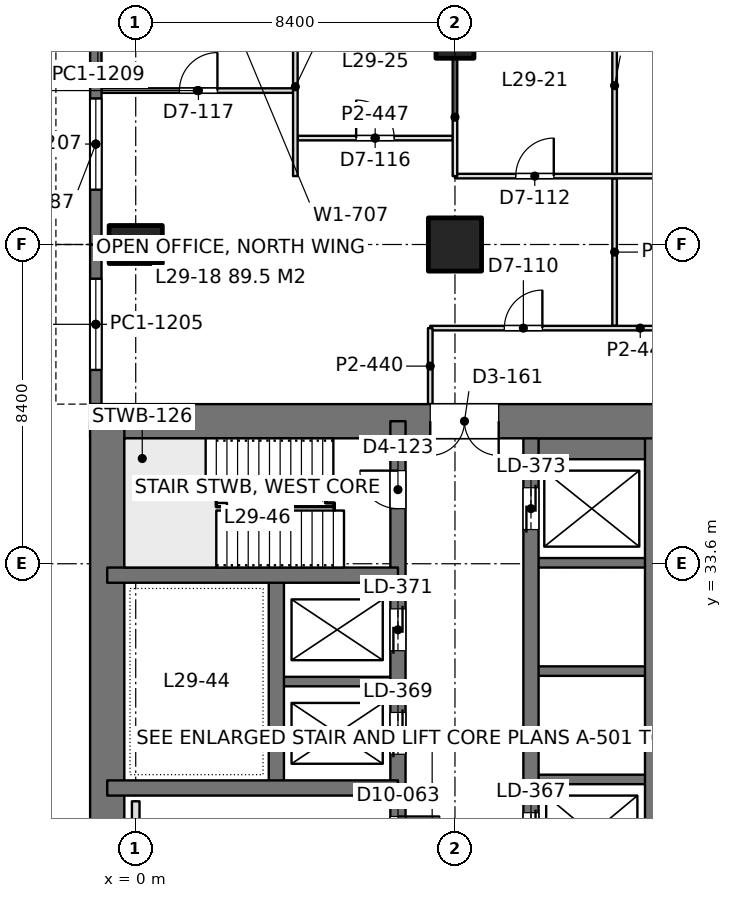
"""IFC4 building model, lengths in metres.
Left out: names, types, materials, properties, quantities, classifications, styles, units other than length and angle.
Written with IfcOpenShell. Run it as: python <this file> out.ifc"""

import sys

from ifc_helpers import new_model, si_unit, direction, frame, frame_2d, origin, origin_2d, place, context, subcontext, project, spatial, rectangle, extrude, element, fill, save


model = new_model("IFC4")
c1 = context("Model", 3, precision=1e-05, world=origin(), true_north=direction((0.0, 1.0)))
c2 = subcontext(c1, "Body", "Model", "MODEL_VIEW")
j1 = project(units=[si_unit("LENGTHUNIT", "METRE"), si_unit("PLANEANGLEUNIT", "RADIAN")], contexts=[c1])
p1 = place(None, origin())
s1 = spatial("IfcSite", under=j1, at=p1, CompositionType="ELEMENT")
p2 = place(p1, origin())
s2 = spatial("IfcBuilding", under=s1, at=p2, CompositionType="ELEMENT")
p3 = place(p2, frame((0.0, 0.0, 130.2)))
s3 = spatial("IfcBuildingStorey", under=s2, at=p3, CompositionType="ELEMENT", Elevation=130.2)
p4 = place(p3, frame((0.0, 42.0, 0.0), z_axis=(0.0, 0.0, 1.0), x_axis=(0.0, 1.0, 0.0)))
e1 = element("IfcColumn", 1, at=p4, inside=s3, PredefinedType="COLUMN", context=c2, shape_type="SweptSolid", body=[
    extrude(rectangle(XDim=1.0, YDim=1.4, at=origin_2d()), origin(), (0.0, 0.0, 1.0), 4.2),
])
p5 = place(p3, frame((8.4, 42.0, 0.0), z_axis=(0.0, 0.0, 1.0), x_axis=(1.0, 0.0, 0.0)))
e2 = element("IfcColumn", 2, at=p5, inside=s3, PredefinedType="COLUMN", context=c2, shape_type="SweptSolid", body=[
    extrude(rectangle(XDim=1.4, YDim=1.4, at=origin_2d()), origin(), (0.0, 0.0, 1.0), 4.2),
])
p6 = place(p3, frame((8.4, 47.6, 0.0), z_axis=(0.0, 0.0, 1.0), x_axis=(1.0, 0.0, 0.0)))
e3 = element("IfcColumn", 3, at=p6, inside=s3, PredefinedType="COLUMN", context=c2, shape_type="SweptSolid", body=[
    extrude(rectangle(XDim=1.0, YDim=1.4, at=origin_2d()), origin(), (0.0, 0.0, 1.0), 4.2),
])
p7 = place(p3, frame((-1.2, 37.35, 0.0), z_axis=(0.0, 0.0, 1.0), x_axis=(1.0, 0.0, 0.0)))
e4 = element("IfcWall", 4, at=p7, inside=s3, PredefinedType="SHEAR", context=c2, shape_type="SweptSolid", body=[
    extrude(rectangle(XDim=18.0, YDim=0.9, at=frame_2d((9.0, 0.0))), origin(), (0.0, 0.0, 1.0), 4.2),
])
p8 = place(p7, frame((8.95, 0.0, 0.0)))
e5 = element("IfcOpeningElement", 5, at=p8, cuts=e4, PredefinedType="OPENING", context=c2, shape_type="SweptSolid", body=[
    extrude(rectangle(XDim=1.8, YDim=2.4, at=frame_2d((0.9, 1.2))), frame((0.0, 0.46, 0.0), z_axis=(0.0, -1.0, 0.0), x_axis=(1.0, 0.0, 0.0)), (0.0, 0.0, 1.0), 0.92),
])
p9 = place(p3, frame((-0.75, 13.05, 0.0), z_axis=(0.0, 0.0, 1.0), x_axis=(0.0, 1.0, 0.0)))
e6 = element("IfcWall", 6, at=p9, inside=s3, PredefinedType="SHEAR", context=c2, shape_type="SweptSolid", body=[
    extrude(rectangle(XDim=24.3, YDim=0.9, at=frame_2d((12.15, 0.0))), origin(), (0.0, 0.0, 1.0), 4.2),
])
p10 = place(p3, frame((6.9, 13.05, 0.0), z_axis=(0.0, 0.0, 1.0), x_axis=(0.0, 1.0, 0.0)))
e7 = element("IfcWall", 7, at=p10, inside=s3, PredefinedType="SHEAR", context=c2, shape_type="SweptSolid", body=[
    extrude(rectangle(XDim=24.3, YDim=0.4, at=frame_2d((12.15, 0.0))), origin(), (0.0, 0.0, 1.0), 4.2),
])
p11 = place(p10, frame((1.3, 0.0, 0.0)))
e8 = element("IfcOpeningElement", 8, at=p11, cuts=e7, PredefinedType="OPENING", context=c2, shape_type="SweptSolid", body=[
    extrude(rectangle(XDim=1.0, YDim=2.2, at=frame_2d((0.5, 1.1))), frame((0.0, 0.21, 0.0), z_axis=(0.0, -1.0, 0.0), x_axis=(1.0, 0.0, 0.0)), (0.0, 0.0, 1.0), 0.42),
])
p12 = place(p10, frame((22.0, 0.0, 0.0)))
e9 = element("IfcOpeningElement", 9, at=p12, cuts=e7, PredefinedType="OPENING", context=c2, shape_type="SweptSolid", body=[
    extrude(rectangle(XDim=1.0, YDim=2.2, at=frame_2d((0.5, 1.1))), frame((0.0, 0.21, 0.0), z_axis=(0.0, -1.0, 0.0), x_axis=(1.0, 0.0, 0.0)), (0.0, 0.0, 1.0), 0.42),
])
p13 = place(p10, frame((5.55, 0.0, 0.0)))
e10 = element("IfcOpeningElement", 10, at=p13, cuts=e7, PredefinedType="OPENING", context=c2, shape_type="SweptSolid", body=[
    extrude(rectangle(XDim=1.0, YDim=2.2, at=frame_2d((0.5, 1.1))), frame((0.0, 0.21, 0.0), z_axis=(0.0, -1.0, 0.0), x_axis=(1.0, 0.0, 0.0)), (0.0, 0.0, 1.0), 0.42),
])
p14 = place(p10, frame((9.55, 0.0, 0.0)))
e11 = element("IfcOpeningElement", 11, at=p14, cuts=e7, PredefinedType="OPENING", context=c2, shape_type="SweptSolid", body=[
    extrude(rectangle(XDim=1.0, YDim=2.2, at=frame_2d((0.5, 1.1))), frame((0.0, 0.21, 0.0), z_axis=(0.0, -1.0, 0.0), x_axis=(1.0, 0.0, 0.0)), (0.0, 0.0, 1.0), 0.42),
])
p15 = place(p10, frame((12.8, 0.0, 0.0)))
e12 = element("IfcOpeningElement", 12, at=p15, cuts=e7, PredefinedType="OPENING", context=c2, shape_type="SweptSolid", body=[
    extrude(rectangle(XDim=1.1, YDim=2.2, at=frame_2d((0.55, 1.1))), frame((0.0, 0.21, 0.0), z_axis=(0.0, -1.0, 0.0), x_axis=(1.0, 0.0, 0.0)), (0.0, 0.0, 1.0), 0.42),
])
p16 = place(p10, frame((15.538, 0.0, 0.0)))
e13 = element("IfcOpeningElement", 13, at=p16, cuts=e7, PredefinedType="OPENING", context=c2, shape_type="SweptSolid", body=[
    extrude(rectangle(XDim=1.1, YDim=2.2, at=frame_2d((0.55, 1.1))), frame((0.0, 0.21, 0.0), z_axis=(0.0, -1.0, 0.0), x_axis=(1.0, 0.0, 0.0)), (0.0, 0.0, 1.0), 0.42),
])
p17 = place(p10, frame((18.262, 0.0, 0.0)))
e14 = element("IfcOpeningElement", 14, at=p17, cuts=e7, PredefinedType="OPENING", context=c2, shape_type="SweptSolid", body=[
    extrude(rectangle(XDim=1.1, YDim=2.2, at=frame_2d((0.55, 1.1))), frame((0.0, 0.21, 0.0), z_axis=(0.0, -1.0, 0.0), x_axis=(1.0, 0.0, 0.0)), (0.0, 0.0, 1.0), 0.42),
])
p18 = place(p3, frame((10.4, 13.05, 0.0), z_axis=(0.0, 0.0, 1.0), x_axis=(0.0, 1.0, 0.0)))
e15 = element("IfcWall", 15, at=p18, inside=s3, PredefinedType="SHEAR", context=c2, shape_type="SweptSolid", body=[
    extrude(rectangle(XDim=24.3, YDim=0.4, at=frame_2d((12.15, 0.0))), origin(), (0.0, 0.0, 1.0), 4.2),
])
p19 = place(p18, frame((10.05, 0.0, 0.0)))
e16 = element("IfcOpeningElement", 16, at=p19, cuts=e15, PredefinedType="OPENING", context=c2, shape_type="SweptSolid", body=[
    extrude(rectangle(XDim=1.1, YDim=2.2, at=frame_2d((0.55, 1.1))), frame((0.0, 0.21, 0.0), z_axis=(0.0, -1.0, 0.0), x_axis=(1.0, 0.0, 0.0)), (0.0, 0.0, 1.0), 0.42),
])
p20 = place(p18, frame((12.9, 0.0, 0.0)))
e17 = element("IfcOpeningElement", 17, at=p20, cuts=e15, PredefinedType="OPENING", context=c2, shape_type="SweptSolid", body=[
    extrude(rectangle(XDim=1.1, YDim=2.2, at=frame_2d((0.55, 1.1))), frame((0.0, 0.21, 0.0), z_axis=(0.0, -1.0, 0.0), x_axis=(1.0, 0.0, 0.0)), (0.0, 0.0, 1.0), 0.42),
])
p21 = place(p18, frame((21.45, 0.0, 0.0)))
e18 = element("IfcOpeningElement", 18, at=p21, cuts=e15, PredefinedType="OPENING", context=c2, shape_type="SweptSolid", body=[
    extrude(rectangle(XDim=1.1, YDim=2.2, at=frame_2d((0.55, 1.1))), frame((0.0, 0.21, 0.0), z_axis=(0.0, -1.0, 0.0), x_axis=(1.0, 0.0, 0.0)), (0.0, 0.0, 1.0), 0.42),
])
p22 = place(p18, frame((2.35, 0.0, 0.0)))
e19 = element("IfcOpeningElement", 19, at=p22, cuts=e15, PredefinedType="OPENING", context=c2, shape_type="SweptSolid", body=[
    extrude(rectangle(XDim=1.8, YDim=2.4, at=frame_2d((0.9, 1.2))), frame((0.0, 0.21, 0.0), z_axis=(0.0, -1.0, 0.0), x_axis=(1.0, 0.0, 0.0)), (0.0, 0.0, 1.0), 0.42),
])
p23 = place(p18, frame((5.8, 0.0, 0.0)))
e20 = element("IfcOpeningElement", 20, at=p23, cuts=e15, PredefinedType="OPENING", context=c2, shape_type="SweptSolid", body=[
    extrude(rectangle(XDim=1.8, YDim=2.4, at=frame_2d((0.9, 1.2))), frame((0.0, 0.21, 0.0), z_axis=(0.0, -1.0, 0.0), x_axis=(1.0, 0.0, 0.0)), (0.0, 0.0, 1.0), 0.42),
])
p24 = place(p3, frame((13.6, 22.225, 0.0), z_axis=(0.0, 0.0, 1.0), x_axis=(0.0, 1.0, 0.0)))
e21 = element("IfcWall", 21, at=p24, inside=s3, PredefinedType="SHEAR", context=c2, shape_type="SweptSolid", body=[
    extrude(rectangle(XDim=15.125, YDim=0.4, at=frame_2d((7.562, 0.0))), origin(), (0.0, 0.0, 1.0), 4.2),
])
for number, where, z_axis, x_axis in (
    (22, (-0.75, 27.7, 0.0), (0.0, 0.0, 1.0), (1.0, 0.0, 0.0)),
    (23, (-0.75, 33.3, 0.0), (0.0, 0.0, 1.0), (1.0, 0.0, 0.0)),
):
    element("IfcWall", number, at=place(p3, frame(where, z_axis=z_axis, x_axis=x_axis)), inside=s3, PredefinedType="SHEAR", context=c2, shape_type="SweptSolid", body=[
        extrude(rectangle(XDim=7.65, YDim=0.4, at=frame_2d((3.825, 0.0))), origin(), (0.0, 0.0, 1.0), 4.2),
    ])
p25 = place(p3, frame((3.7, 27.7, 0.0), z_axis=(0.0, 0.0, 1.0), x_axis=(0.0, 1.0, 0.0)))
e24 = element("IfcWall", 24, at=p25, inside=s3, PredefinedType="SHEAR", context=c2, shape_type="SweptSolid", body=[
    extrude(rectangle(XDim=5.6, YDim=0.4, at=frame_2d((2.8, 0.0))), origin(), (0.0, 0.0, 1.0), 4.2),
])
p26 = place(p3, frame((3.7, 30.5, 0.0), z_axis=(0.0, 0.0, 1.0), x_axis=(1.0, 0.0, 0.0)))
e25 = element("IfcWall", 25, at=p26, inside=s3, PredefinedType="SHEAR", context=c2, shape_type="SweptSolid", body=[
    extrude(rectangle(XDim=3.2, YDim=0.25, at=frame_2d((1.6, 0.0))), origin(), (0.0, 0.0, 1.0), 4.2),
])
for number, where, z_axis, x_axis in (
    (26, (10.4, 27.925, 0.0), (0.0, 0.0, 1.0), (1.0, 0.0, 0.0)),
    (27, (10.4, 30.775, 0.0), (0.0, 0.0, 1.0), (1.0, 0.0, 0.0)),
    (28, (10.4, 33.625, 0.0), (0.0, 0.0, 1.0), (1.0, 0.0, 0.0)),
):
    element("IfcWall", number, at=place(p3, frame(where, z_axis=z_axis, x_axis=x_axis)), inside=s3, PredefinedType="SHEAR", context=c2, shape_type="SweptSolid", body=[
        extrude(rectangle(XDim=3.2, YDim=0.25, at=frame_2d((1.6, 0.0))), origin(), (0.0, 0.0, 1.0), 4.2),
    ])
p27 = place(p3, frame((10.4, 36.625, 0.0), z_axis=(0.0, 0.0, 1.0), x_axis=(1.0, 0.0, 0.0)))
e29 = element("IfcWall", 29, at=p27, inside=s3, PredefinedType="SHEAR", context=c2, shape_type="SweptSolid", body=[
    extrude(rectangle(XDim=3.2, YDim=0.55, at=frame_2d((1.6, 0.0))), origin(), (0.0, 0.0, 1.0), 4.2),
])
p28 = place(p3, frame((-1.05, 37.8, 0.0), z_axis=(0.0, 0.0, 1.0), x_axis=(0.0, 1.0, 0.0)))
e30 = element("IfcWall", 30, at=p28, inside=s3, PredefinedType="SOLIDWALL", context=c2, shape_type="SweptSolid", body=[
    extrude(rectangle(XDim=4.2, YDim=0.3, at=frame_2d((2.1, 0.0))), origin(), (0.0, 0.0, 1.0), 4.05),
])
p29 = place(p28, frame((0.9, 0.0, 0.9)))
e31 = element("IfcOpeningElement", 31, at=p29, cuts=e30, PredefinedType="OPENING", context=c2, shape_type="SweptSolid", body=[
    extrude(rectangle(XDim=2.4, YDim=1.9, at=frame_2d((1.2, 0.95))), frame((0.0, 0.16, 0.0), z_axis=(0.0, -1.0, 0.0), x_axis=(1.0, 0.0, 0.0)), (0.0, 0.0, 1.0), 0.32),
])
p30 = place(p3, frame((-1.05, 42.0, 0.0), z_axis=(0.0, 0.0, 1.0), x_axis=(0.0, 1.0, 0.0)))
e32 = element("IfcWall", 32, at=p30, inside=s3, PredefinedType="SOLIDWALL", context=c2, shape_type="SweptSolid", body=[
    extrude(rectangle(XDim=5.285, YDim=0.3, at=frame_2d((2.643, 0.0))), origin(), (0.0, 0.0, 1.0), 4.05),
])
p31 = place(p30, frame((1.443, 0.0, 0.9)))
e33 = element("IfcOpeningElement", 33, at=p31, cuts=e32, PredefinedType="OPENING", context=c2, shape_type="SweptSolid", body=[
    extrude(rectangle(XDim=2.4, YDim=1.9, at=frame_2d((1.2, 0.95))), frame((0.0, 0.16, 0.0), z_axis=(0.0, -1.0, 0.0), x_axis=(1.0, 0.0, 0.0)), (0.0, 0.0, 1.0), 0.32),
])
p32 = place(p3, frame((-0.902, 46.05, 0.0), z_axis=(0.0, 0.0, 1.0), x_axis=(1.0, 0.0, 0.0)))
e34 = element("IfcWall", 34, at=p32, inside=s3, PredefinedType="PARTITIONING", context=c2, shape_type="SweptSolid", body=[
    extrude(rectangle(XDim=5.044, YDim=0.12, at=frame_2d((2.522, 0.0))), origin(), (0.0, 0.0, 1.0), 3.56),
])
p33 = place(p32, frame((2.052, 0.0, 0.0)))
e35 = element("IfcOpeningElement", 35, at=p33, cuts=e34, PredefinedType="OPENING", context=c2, shape_type="SweptSolid", body=[
    extrude(rectangle(XDim=1.0, YDim=2.4, at=frame_2d((0.5, 1.2))), frame((0.0, 0.07, 0.0), z_axis=(0.0, -1.0, 0.0), x_axis=(1.0, 0.0, 0.0)), (0.0, 0.0, 1.0), 0.14),
])
p34 = place(p3, frame((4.258, 44.8, 0.0), z_axis=(0.0, 0.0, 1.0), x_axis=(1.0, 0.0, 0.0)))
e36 = element("IfcWall", 36, at=p34, inside=s3, PredefinedType="PARTITIONING", context=c2, shape_type="SweptSolid", body=[
    extrude(rectangle(XDim=4.084, YDim=0.12, at=frame_2d((2.042, 0.0))), origin(), (0.0, 0.0, 1.0), 3.55),
])
p35 = place(p34, frame((1.542, 0.0, 0.0)))
e37 = element("IfcOpeningElement", 37, at=p35, cuts=e36, PredefinedType="OPENING", context=c2, shape_type="SweptSolid", body=[
    extrude(rectangle(XDim=1.0, YDim=2.4, at=frame_2d((0.5, 1.2))), frame((0.0, 0.07, 0.0), z_axis=(0.0, -1.0, 0.0), x_axis=(1.0, 0.0, 0.0)), (0.0, 0.0, 1.0), 0.14),
])
p36 = place(p3, frame((8.4, 43.8, 0.0), z_axis=(0.0, 0.0, 1.0), x_axis=(1.0, 0.0, 0.0)))
e38 = element("IfcWall", 38, at=p36, inside=s3, PredefinedType="PARTITIONING", context=c2, shape_type="SweptSolid", body=[
    extrude(rectangle(XDim=16.8, YDim=0.12, at=frame_2d((8.4, 0.0))), origin(), (0.0, 0.0, 1.0), 3.55),
])
p37 = place(p36, frame((1.6, 0.0, 0.0)))
e39 = element("IfcOpeningElement", 39, at=p37, cuts=e38, PredefinedType="OPENING", context=c2, shape_type="SweptSolid", body=[
    extrude(rectangle(XDim=1.0, YDim=2.4, at=frame_2d((0.5, 1.2))), frame((0.0, 0.07, 0.0), z_axis=(0.0, -1.0, 0.0), x_axis=(1.0, 0.0, 0.0)), (0.0, 0.0, 1.0), 0.14),
])
p38 = place(p36, frame((5.8, 0.0, 0.0)))
e40 = element("IfcOpeningElement", 40, at=p38, cuts=e38, PredefinedType="OPENING", context=c2, shape_type="SweptSolid", body=[
    extrude(rectangle(XDim=1.0, YDim=2.4, at=frame_2d((0.5, 1.2))), frame((0.0, 0.07, 0.0), z_axis=(0.0, -1.0, 0.0), x_axis=(1.0, 0.0, 0.0)), (0.0, 0.0, 1.0), 0.14),
])
p39 = place(p36, frame((10.0, 0.0, 0.0)))
e41 = element("IfcOpeningElement", 41, at=p39, cuts=e38, PredefinedType="OPENING", context=c2, shape_type="SweptSolid", body=[
    extrude(rectangle(XDim=1.0, YDim=2.4, at=frame_2d((0.5, 1.2))), frame((0.0, 0.07, 0.0), z_axis=(0.0, -1.0, 0.0), x_axis=(1.0, 0.0, 0.0)), (0.0, 0.0, 1.0), 0.14),
])
p40 = place(p36, frame((14.2, 0.0, 0.0)))
e42 = element("IfcOpeningElement", 42, at=p40, cuts=e38, PredefinedType="OPENING", context=c2, shape_type="SweptSolid", body=[
    extrude(rectangle(XDim=1.0, YDim=2.4, at=frame_2d((0.5, 1.2))), frame((0.0, 0.07, 0.0), z_axis=(0.0, -1.0, 0.0), x_axis=(1.0, 0.0, 0.0)), (0.0, 0.0, 1.0), 0.14),
])
p41 = place(p3, frame((4.2, 43.8, 0.0), z_axis=(0.0, 0.0, 1.0), x_axis=(0.0, 1.0, 0.0)))
e43 = element("IfcWall", 43, at=p41, inside=s3, PredefinedType="PARTITIONING", context=c2, shape_type="SweptSolid", body=[
    extrude(rectangle(XDim=4.702, YDim=0.12, at=frame_2d((2.351, 0.0))), origin(), (0.0, 0.0, 1.0), 3.56),
])
p42 = place(p3, frame((8.4, 43.8, 0.0), z_axis=(0.0, 0.0, 1.0), x_axis=(0.0, 1.0, 0.0)))
e44 = element("IfcWall", 44, at=p42, inside=s3, PredefinedType="PARTITIONING", context=c2, shape_type="SweptSolid", body=[
    extrude(rectangle(XDim=3.101, YDim=0.12, at=frame_2d((1.55, 0.0))), origin(), (0.0, 0.0, 1.0), 3.55),
])
p43 = place(p3, frame((12.6, 43.858, 0.0), z_axis=(0.0, 0.0, 1.0), x_axis=(0.0, 1.0, 0.0)))
e45 = element("IfcWall", 45, at=p43, inside=s3, PredefinedType="PARTITIONING", context=c2, shape_type="SweptSolid", body=[
    extrude(rectangle(XDim=4.644, YDim=0.12, at=frame_2d((2.322, 0.0))), origin(), (0.0, 0.0, 1.0), 3.56),
])
p44 = place(p3, frame((12.6, 39.858, 0.0), z_axis=(0.0, 0.0, 1.0), x_axis=(0.0, 1.0, 0.0)))
e46 = element("IfcWall", 46, at=p44, inside=s3, PredefinedType="PARTITIONING", context=c2, shape_type="SweptSolid", body=[
    extrude(rectangle(XDim=3.884, YDim=0.12, at=frame_2d((1.942, 0.0))), origin(), (0.0, 0.0, 1.0), 3.55),
])
p45 = place(p3, frame((7.75, 39.8, 0.0), z_axis=(0.0, 0.0, 1.0), x_axis=(1.0, 0.0, 0.0)))
e47 = element("IfcWall", 47, at=p45, inside=s3, PredefinedType="PARTITIONING", context=c2, shape_type="SweptSolid", body=[
    extrude(rectangle(XDim=11.05, YDim=0.12, at=frame_2d((5.525, 0.0))), origin(), (0.0, 0.0, 1.0), 3.69),
])
p46 = place(p45, frame((1.95, 0.0, 0.0)))
e48 = element("IfcOpeningElement", 48, at=p46, cuts=e47, PredefinedType="OPENING", context=c2, shape_type="SweptSolid", body=[
    extrude(rectangle(XDim=1.0, YDim=2.4, at=frame_2d((0.5, 1.2))), frame((0.0, 0.07, 0.0), z_axis=(0.0, -1.0, 0.0), x_axis=(1.0, 0.0, 0.0)), (0.0, 0.0, 1.0), 0.14),
])
p47 = place(p45, frame((6.95, 0.0, 0.0)))
e49 = element("IfcOpeningElement", 49, at=p47, cuts=e47, PredefinedType="OPENING", context=c2, shape_type="SweptSolid", body=[
    extrude(rectangle(XDim=1.8, YDim=2.2, at=frame_2d((0.9, 1.1))), frame((0.0, 0.07, 0.0), z_axis=(0.0, -1.0, 0.0), x_axis=(1.0, 0.0, 0.0)), (0.0, 0.0, 1.0), 0.14),
])
p48 = place(p3, frame((7.75, 37.8, 0.0), z_axis=(0.0, 0.0, 1.0), x_axis=(0.0, 1.0, 0.0)))
e50 = element("IfcWall", 50, at=p48, inside=s3, PredefinedType="PARTITIONING", context=c2, shape_type="SweptSolid", body=[
    extrude(rectangle(XDim=2.0, YDim=0.12, at=frame_2d((1.0, 0.0))), origin(), (0.0, 0.0, 1.0), 4.05),
])
p49 = place(p3, frame((0.0, 25.45, 0.0), z_axis=(0.0, 0.0, 1.0), x_axis=(0.0, 1.0, 0.0)))
e51 = element("IfcWall", 51, at=p49, inside=s3, PredefinedType="PLUMBINGWALL", context=c2, shape_type="SweptSolid", body=[
    extrude(rectangle(XDim=1.9, YDim=0.2, at=frame_2d((0.95, 0.0))), origin(), (0.0, 0.0, 1.0), 1.2),
])
p50 = place(p29, origin())
e52 = element("IfcWindow", 52, at=p50, inside=s3, PartitioningType="SINGLE_PANEL", PredefinedType="WINDOW", context=c2, shape_type="SweptSolid", body=[
    extrude(rectangle(XDim=2.4, YDim=1.9, at=frame_2d((1.2, 0.95))), frame((0.0, 0.03, 0.0), z_axis=(0.0, -1.0, 0.0), x_axis=(1.0, 0.0, 0.0)), (0.0, 0.0, 1.0), 0.06),
])
fill(e31, e52)
p51 = place(p31, origin())
e53 = element("IfcWindow", 53, at=p51, inside=s3, PartitioningType="SINGLE_PANEL", PredefinedType="WINDOW", context=c2, shape_type="SweptSolid", body=[
    extrude(rectangle(XDim=2.4, YDim=1.9, at=frame_2d((1.2, 0.95))), frame((0.0, 0.03, 0.0), z_axis=(0.0, -1.0, 0.0), x_axis=(1.0, 0.0, 0.0)), (0.0, 0.0, 1.0), 0.06),
])
fill(e33, e53)
p52 = place(p8, frame((1.8, 0.0, 0.0), z_axis=(0.0, 0.0, 1.0), x_axis=(-1.0, 0.0, 0.0)))
e54 = element("IfcDoor", 54, at=p52, inside=s3, OperationType="DOUBLE_DOOR_SINGLE_SWING", PredefinedType="DOOR", context=c2, shape_type="SweptSolid", body=[
    extrude(rectangle(XDim=1.8, YDim=2.4, at=frame_2d((0.9, 1.2))), frame((0.0, 0.025, 0.0), z_axis=(0.0, -1.0, 0.0), x_axis=(1.0, 0.0, 0.0)), (0.0, 0.0, 1.0), 0.05),
])
fill(e5, e54)
p53 = place(p12, origin())
e55 = element("IfcDoor", 55, at=p53, inside=s3, OperationType="SINGLE_SWING_RIGHT", PredefinedType="DOOR", context=c2, shape_type="SweptSolid", body=[
    extrude(rectangle(XDim=1.0, YDim=2.2, at=frame_2d((0.5, 1.1))), frame((0.0, 0.025, 0.0), z_axis=(0.0, -1.0, 0.0), x_axis=(1.0, 0.0, 0.0)), (0.0, 0.0, 1.0), 0.05),
])
fill(e9, e55)
p54 = place(p15, frame((1.1, 0.0, 0.0), z_axis=(0.0, 0.0, 1.0), x_axis=(-1.0, 0.0, 0.0)))
e56 = element("IfcDoor", 56, at=p54, inside=s3, OperationType="SINGLE_SWING_LEFT", PredefinedType="DOOR", context=c2, shape_type="SweptSolid", body=[
    extrude(rectangle(XDim=1.1, YDim=2.2, at=frame_2d((0.55, 1.1))), frame((0.0, 0.025, 0.0), z_axis=(0.0, -1.0, 0.0), x_axis=(1.0, 0.0, 0.0)), (0.0, 0.0, 1.0), 0.05),
])
fill(e12, e56)
p55 = place(p20, origin())
e57 = element("IfcDoor", 57, at=p55, inside=s3, OperationType="DOUBLE_DOOR_SLIDING", PredefinedType="DOOR", context=c2, shape_type="SweptSolid", body=[
    extrude(rectangle(XDim=1.1, YDim=2.2, at=frame_2d((0.55, 1.1))), frame((0.0, 0.025, 0.0), z_axis=(0.0, -1.0, 0.0), x_axis=(1.0, 0.0, 0.0)), (0.0, 0.0, 1.0), 0.05),
])
fill(e17, e57)
p56 = place(p21, origin())
e58 = element("IfcDoor", 58, at=p56, inside=s3, OperationType="DOUBLE_DOOR_SLIDING", PredefinedType="DOOR", context=c2, shape_type="SweptSolid", body=[
    extrude(rectangle(XDim=1.1, YDim=2.2, at=frame_2d((0.55, 1.1))), frame((0.0, 0.025, 0.0), z_axis=(0.0, -1.0, 0.0), x_axis=(1.0, 0.0, 0.0)), (0.0, 0.0, 1.0), 0.05),
])
fill(e18, e58)
p57 = place(p16, origin())
e59 = element("IfcDoor", 59, at=p57, inside=s3, OperationType="DOUBLE_DOOR_SLIDING", PredefinedType="DOOR", context=c2, shape_type="SweptSolid", body=[
    extrude(rectangle(XDim=1.1, YDim=2.2, at=frame_2d((0.55, 1.1))), frame((0.0, 0.025, 0.0), z_axis=(0.0, -1.0, 0.0), x_axis=(1.0, 0.0, 0.0)), (0.0, 0.0, 1.0), 0.05),
])
fill(e13, e59)
p58 = place(p17, origin())
e60 = element("IfcDoor", 60, at=p58, inside=s3, OperationType="DOUBLE_DOOR_SLIDING", PredefinedType="DOOR", context=c2, shape_type="SweptSolid", body=[
    extrude(rectangle(XDim=1.1, YDim=2.2, at=frame_2d((0.55, 1.1))), frame((0.0, 0.025, 0.0), z_axis=(0.0, -1.0, 0.0), x_axis=(1.0, 0.0, 0.0)), (0.0, 0.0, 1.0), 0.05),
])
fill(e14, e60)
p59 = place(p33, origin())
e61 = element("IfcDoor", 61, at=p59, inside=s3, OperationType="SINGLE_SWING_RIGHT", PredefinedType="DOOR", context=c2, shape_type="SweptSolid", body=[
    extrude(rectangle(XDim=1.0, YDim=2.4, at=frame_2d((0.5, 1.2))), frame((0.0, 0.025, 0.0), z_axis=(0.0, -1.0, 0.0), x_axis=(1.0, 0.0, 0.0)), (0.0, 0.0, 1.0), 0.05),
])
fill(e35, e61)
p60 = place(p35, origin())
e62 = element("IfcDoor", 62, at=p60, inside=s3, OperationType="SINGLE_SWING_LEFT", PredefinedType="DOOR", context=c2, shape_type="SweptSolid", body=[
    extrude(rectangle(XDim=1.0, YDim=2.4, at=frame_2d((0.5, 1.2))), frame((0.0, 0.025, 0.0), z_axis=(0.0, -1.0, 0.0), x_axis=(1.0, 0.0, 0.0)), (0.0, 0.0, 1.0), 0.05),
])
fill(e37, e62)
p61 = place(p37, origin())
e63 = element("IfcDoor", 63, at=p61, inside=s3, OperationType="SINGLE_SWING_RIGHT", PredefinedType="DOOR", context=c2, shape_type="SweptSolid", body=[
    extrude(rectangle(XDim=1.0, YDim=2.4, at=frame_2d((0.5, 1.2))), frame((0.0, 0.025, 0.0), z_axis=(0.0, -1.0, 0.0), x_axis=(1.0, 0.0, 0.0)), (0.0, 0.0, 1.0), 0.05),
])
fill(e39, e63)
p62 = place(p46, origin())
e64 = element("IfcDoor", 64, at=p62, inside=s3, OperationType="SINGLE_SWING_RIGHT", PredefinedType="DOOR", context=c2, shape_type="SweptSolid", body=[
    extrude(rectangle(XDim=1.0, YDim=2.4, at=frame_2d((0.5, 1.2))), frame((0.0, 0.025, 0.0), z_axis=(0.0, -1.0, 0.0), x_axis=(1.0, 0.0, 0.0)), (0.0, 0.0, 1.0), 0.05),
])
fill(e48, e64)
save(model, sys.argv[1])
